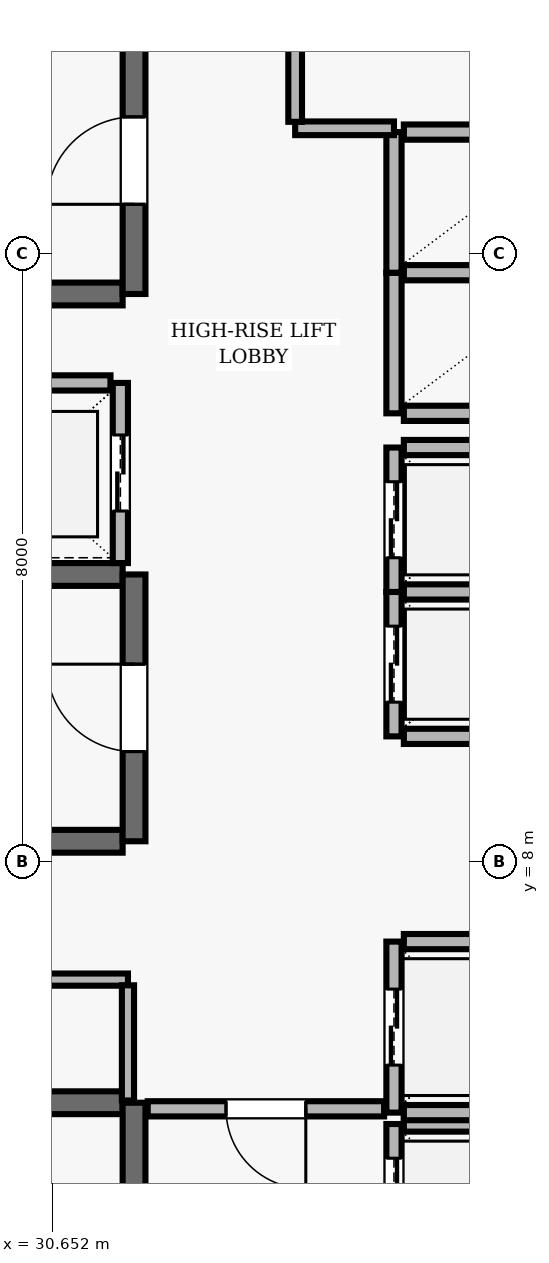
"""IFC4 building model, lengths in metres.
Left out: names, types, materials, properties, quantities, classifications, styles, units other than length and angle.
Written with IfcOpenShell. Run it as: python <this file> out.ifc"""

import sys

from ifc_helpers import new_model, si_unit, direction, frame, frame_2d, origin, place, context, subcontext, project, spatial, rectangle, extrude, element, fill, save


model = new_model("IFC4")
c1 = context("Model", 3, precision=1e-05, world=origin(), true_north=direction((0.0, 1.0)))
c2 = subcontext(c1, "Body", "Model", "MODEL_VIEW")
j1 = project(units=[si_unit("LENGTHUNIT", "METRE"), si_unit("PLANEANGLEUNIT", "RADIAN")], contexts=[c1])
p1 = place(None, origin())
s1 = spatial("IfcSite", under=j1, at=p1, CompositionType="ELEMENT")
p2 = place(p1, origin())
s2 = spatial("IfcBuilding", under=s1, at=p2, CompositionType="ELEMENT")
p3 = place(p2, frame((0.0, 0.0, 256.0)))
s3 = spatial("IfcBuildingStorey", under=s2, at=p3, CompositionType="ELEMENT", Elevation=256.0)
p4 = place(p3, frame((31.58, 4.83, 0.0), z_axis=(0.0, 0.0, 1.0), x_axis=(-1.0, 0.0, 0.0)))
e1 = element("IfcWall", 1, at=p4, inside=s3, PredefinedType="SHEAR", context=c2, shape_type="SweptSolid", body=[
    extrude(rectangle(XDim=8.36, YDim=0.3, at=frame_2d((4.18, 0.0))), origin(), (0.0, 0.0, 1.0), 3.69),
])
p5 = place(p3, frame((31.73, 0.96, 0.0), z_axis=(0.0, 0.0, 1.0), x_axis=(0.0, 1.0, 0.0)))
e2 = element("IfcWall", 2, at=p5, inside=s3, PredefinedType="SHEAR", context=c2, shape_type="SweptSolid", body=[
    extrude(rectangle(XDim=3.87, YDim=0.3, at=frame_2d((1.935, 0.0))), origin(), (0.0, 0.0, 1.0), 3.69),
])
p6 = place(p5, frame((1.54, 0.0, 0.0)))
e3 = element("IfcOpeningElement", 3, at=p6, cuts=e2, PredefinedType="OPENING", context=c2, shape_type="SweptSolid", body=[
    extrude(rectangle(XDim=1.15, YDim=2.15, at=frame_2d((0.575, 1.075))), frame((0.0, 0.16, 0.0), z_axis=(0.0, -1.0, 0.0), x_axis=(1.0, 0.0, 0.0)), (0.0, 0.0, 1.0), 0.32),
])
p7 = place(p3, frame((23.22, 15.47, 0.0), z_axis=(0.0, 0.0, 1.0), x_axis=(1.0, 0.0, 0.0)))
e4 = element("IfcWall", 4, at=p7, inside=s3, PredefinedType="SHEAR", context=c2, shape_type="SweptSolid", body=[
    extrude(rectangle(XDim=8.36, YDim=0.3, at=frame_2d((4.18, 0.0))), origin(), (0.0, 0.0, 1.0), 3.69),
])
p8 = place(p3, frame((31.73, 15.47, 0.0), z_axis=(0.0, 0.0, 1.0), x_axis=(0.0, 1.0, 0.0)))
e5 = element("IfcWall", 5, at=p8, inside=s3, PredefinedType="SHEAR", context=c2, shape_type="SweptSolid", body=[
    extrude(rectangle(XDim=3.51, YDim=0.3, at=frame_2d((1.755, 0.0))), origin(), (0.0, 0.0, 1.0), 3.69),
])
p9 = place(p8, frame((1.18, 0.0, 0.0)))
e6 = element("IfcOpeningElement", 6, at=p9, cuts=e5, PredefinedType="OPENING", context=c2, shape_type="SweptSolid", body=[
    extrude(rectangle(XDim=1.15, YDim=2.15, at=frame_2d((0.575, 1.075))), frame((0.0, 0.16, 0.0), z_axis=(0.0, -1.0, 0.0), x_axis=(1.0, 0.0, 0.0)), (0.0, 0.0, 1.0), 0.32),
])
for number, where, z_axis, x_axis in (
    (7, (31.58, 11.78, 0.0), (0.0, 0.0, 1.0), (-1.0, 0.0, 0.0)),
    (8, (23.22, 8.27, 0.0), (0.0, 0.0, 1.0), (1.0, 0.0, 0.0)),
):
    element("IfcWall", number, at=place(p3, frame(where, z_axis=z_axis, x_axis=x_axis)), inside=s3, PredefinedType="SHEAR", context=c2, shape_type="SweptSolid", body=[
        extrude(rectangle(XDim=8.36, YDim=0.3, at=frame_2d((4.18, 0.0))), origin(), (0.0, 0.0, 1.0), 3.69),
    ])
p10 = place(p3, frame((31.73, 8.27, 0.0), z_axis=(0.0, 0.0, 1.0), x_axis=(0.0, 1.0, 0.0)))
e9 = element("IfcWall", 9, at=p10, inside=s3, PredefinedType="SHEAR", context=c2, shape_type="SweptSolid", body=[
    extrude(rectangle(XDim=3.51, YDim=0.3, at=frame_2d((1.755, 0.0))), origin(), (0.0, 0.0, 1.0), 3.69),
])
p11 = place(p10, frame((1.18, 0.0, 0.0)))
e10 = element("IfcOpeningElement", 10, at=p11, cuts=e9, PredefinedType="OPENING", context=c2, shape_type="SweptSolid", body=[
    extrude(rectangle(XDim=1.15, YDim=2.15, at=frame_2d((0.575, 1.075))), frame((0.0, 0.16, 0.0), z_axis=(0.0, -1.0, 0.0), x_axis=(1.0, 0.0, 0.0)), (0.0, 0.0, 1.0), 0.32),
])
p12 = place(p3, frame((35.15, 4.55, 0.0), z_axis=(0.0, 0.0, 1.0), x_axis=(0.0, -1.0, 0.0)))
e11 = element("IfcWall", 11, at=p12, inside=s3, PredefinedType="SOLIDWALL", context=c2, shape_type="SweptSolid", body=[
    extrude(rectangle(XDim=2.1, YDim=0.2, at=frame_2d((1.05, 0.0))), origin(), (0.0, 0.0, 1.0), 3.69),
])
p13 = place(p12, frame((0.45, 0.0, 0.0)))
e12 = element("IfcOpeningElement", 12, at=p13, cuts=e11, PredefinedType="OPENING", context=c2, shape_type="SweptSolid", body=[
    extrude(rectangle(XDim=1.2, YDim=2.15, at=frame_2d((0.6, 1.075))), frame((0.0, 0.11, 0.0), z_axis=(0.0, -1.0, 0.0), x_axis=(1.0, 0.0, 0.0)), (0.0, 0.0, 1.0), 0.22),
])
p14 = place(p3, frame((37.42, 4.55, 0.0), z_axis=(0.0, 0.0, 1.0), x_axis=(-1.0, 0.0, 0.0)))
e13 = element("IfcWall", 13, at=p14, inside=s3, PredefinedType="SOLIDWALL", context=c2, shape_type="SweptSolid", body=[
    extrude(rectangle(XDim=2.14, YDim=0.2, at=frame_2d((1.07, 0.0))), origin(), (0.0, 0.0, 1.0), 3.69),
])
p15 = place(p3, frame((35.15, 6.95, 0.0), z_axis=(0.0, 0.0, 1.0), x_axis=(0.0, -1.0, 0.0)))
e14 = element("IfcWall", 14, at=p15, inside=s3, PredefinedType="SOLIDWALL", context=c2, shape_type="SweptSolid", body=[
    extrude(rectangle(XDim=2.25, YDim=0.2, at=frame_2d((1.125, 0.0))), origin(), (0.0, 0.0, 1.0), 3.69),
])
p16 = place(p15, frame((0.625, 0.0, 0.0)))
e15 = element("IfcOpeningElement", 15, at=p16, cuts=e14, PredefinedType="OPENING", context=c2, shape_type="SweptSolid", body=[
    extrude(rectangle(XDim=1.0, YDim=2.1, at=frame_2d((0.5, 1.05))), frame((0.0, 0.11, 0.0), z_axis=(0.0, -1.0, 0.0), x_axis=(1.0, 0.0, 0.0)), (0.0, 0.0, 1.0), 0.22),
])
for number, where, z_axis, x_axis in (
    (16, (35.28, 4.7, 0.0), (0.0, 0.0, 1.0), (1.0, 0.0, 0.0)),
    (17, (37.42, 6.95, 0.0), (0.0, 0.0, 1.0), (-1.0, 0.0, 0.0)),
):
    element("IfcWall", number, at=place(p3, frame(where, z_axis=z_axis, x_axis=x_axis)), inside=s3, PredefinedType="SOLIDWALL", context=c2, shape_type="SweptSolid", body=[
        extrude(rectangle(XDim=2.14, YDim=0.2, at=frame_2d((1.07, 0.0))), origin(), (0.0, 0.0, 1.0), 3.69),
    ])
p17 = place(p3, frame((35.15, 11.55, 0.0), z_axis=(0.0, 0.0, 1.0), x_axis=(0.0, -1.0, 0.0)))
e18 = element("IfcWall", 18, at=p17, inside=s3, PredefinedType="SOLIDWALL", context=c2, shape_type="SweptSolid", body=[
    extrude(rectangle(XDim=1.9, YDim=0.2, at=frame_2d((0.95, 0.0))), origin(), (0.0, 0.0, 1.0), 3.69),
])
p18 = place(p17, frame((0.45, 0.0, 0.0)))
e19 = element("IfcOpeningElement", 19, at=p18, cuts=e18, PredefinedType="OPENING", context=c2, shape_type="SweptSolid", body=[
    extrude(rectangle(XDim=1.0, YDim=2.1, at=frame_2d((0.5, 1.05))), frame((0.0, 0.11, 0.0), z_axis=(0.0, -1.0, 0.0), x_axis=(1.0, 0.0, 0.0)), (0.0, 0.0, 1.0), 0.22),
])
for number, where, z_axis, x_axis in (
    (20, (35.28, 9.65, 0.0), (0.0, 0.0, 1.0), (1.0, 0.0, 0.0)),
    (21, (37.42, 11.55, 0.0), (0.0, 0.0, 1.0), (-1.0, 0.0, 0.0)),
):
    element("IfcWall", number, at=place(p3, frame(where, z_axis=z_axis, x_axis=x_axis)), inside=s3, PredefinedType="SOLIDWALL", context=c2, shape_type="SweptSolid", body=[
        extrude(rectangle(XDim=2.14, YDim=0.2, at=frame_2d((1.07, 0.0))), origin(), (0.0, 0.0, 1.0), 3.69),
    ])
p19 = place(p3, frame((35.15, 13.45, 0.0), z_axis=(0.0, 0.0, 1.0), x_axis=(0.0, -1.0, 0.0)))
e22 = element("IfcWall", 22, at=p19, inside=s3, PredefinedType="SOLIDWALL", context=c2, shape_type="SweptSolid", body=[
    extrude(rectangle(XDim=1.9, YDim=0.2, at=frame_2d((0.95, 0.0))), origin(), (0.0, 0.0, 1.0), 3.69),
])
p20 = place(p19, frame((0.45, 0.0, 0.0)))
e23 = element("IfcOpeningElement", 23, at=p20, cuts=e22, PredefinedType="OPENING", context=c2, shape_type="SweptSolid", body=[
    extrude(rectangle(XDim=1.0, YDim=2.1, at=frame_2d((0.5, 1.05))), frame((0.0, 0.11, 0.0), z_axis=(0.0, -1.0, 0.0), x_axis=(1.0, 0.0, 0.0)), (0.0, 0.0, 1.0), 0.22),
])
p21 = place(p3, frame((37.42, 13.45, 0.0), z_axis=(0.0, 0.0, 1.0), x_axis=(-1.0, 0.0, 0.0)))
e24 = element("IfcWall", 24, at=p21, inside=s3, PredefinedType="SOLIDWALL", context=c2, shape_type="SweptSolid", body=[
    extrude(rectangle(XDim=2.14, YDim=0.2, at=frame_2d((1.07, 0.0))), origin(), (0.0, 0.0, 1.0), 3.69),
])
p22 = place(p3, frame((31.55, 11.93, 0.0), z_axis=(0.0, 0.0, 1.0), x_axis=(0.0, 1.0, 0.0)))
e25 = element("IfcWall", 25, at=p22, inside=s3, PredefinedType="SOLIDWALL", context=c2, shape_type="SweptSolid", body=[
    extrude(rectangle(XDim=2.37, YDim=0.2, at=frame_2d((1.185, 0.0))), origin(), (0.0, 0.0, 1.0), 3.69),
])
p23 = place(p22, frame((0.685, 0.0, 0.0)))
e26 = element("IfcOpeningElement", 26, at=p23, cuts=e25, PredefinedType="OPENING", context=c2, shape_type="SweptSolid", body=[
    extrude(rectangle(XDim=1.0, YDim=2.1, at=frame_2d((0.5, 1.05))), frame((0.0, 0.11, 0.0), z_axis=(0.0, -1.0, 0.0), x_axis=(1.0, 0.0, 0.0)), (0.0, 0.0, 1.0), 0.22),
])
p24 = place(p3, frame((31.42, 14.3, 0.0), z_axis=(0.0, 0.0, 1.0), x_axis=(-1.0, 0.0, 0.0)))
e27 = element("IfcWall", 27, at=p24, inside=s3, PredefinedType="SOLIDWALL", context=c2, shape_type="SweptSolid", body=[
    extrude(rectangle(XDim=2.44, YDim=0.2, at=frame_2d((1.22, 0.0))), origin(), (0.0, 0.0, 1.0), 3.69),
])
p25 = place(p3, frame((35.15, 15.75, 0.0), z_axis=(0.0, 0.0, 1.0), x_axis=(0.0, -1.0, 0.0)))
e28 = element("IfcWall", 28, at=p25, inside=s3, PredefinedType="SOLIDWALL", context=c2, shape_type="SweptSolid", body=[
    extrude(rectangle(XDim=1.85, YDim=0.2, at=frame_2d((0.925, 0.0))), origin(), (0.0, 0.0, 1.0), 3.69),
])
for number, where, z_axis, x_axis in (
    (29, (35.28, 13.9, 0.0), (0.0, 0.0, 1.0), (1.0, 0.0, 0.0)),
    (30, (37.42, 15.75, 0.0), (0.0, 0.0, 1.0), (-1.0, 0.0, 0.0)),
):
    element("IfcWall", number, at=place(p3, frame(where, z_axis=z_axis, x_axis=x_axis)), inside=s3, PredefinedType="SOLIDWALL", context=c2, shape_type="SweptSolid", body=[
        extrude(rectangle(XDim=2.14, YDim=0.2, at=frame_2d((1.07, 0.0))), origin(), (0.0, 0.0, 1.0), 3.69),
    ])
p26 = place(p3, frame((35.15, 17.6, 0.0), z_axis=(0.0, 0.0, 1.0), x_axis=(0.0, -1.0, 0.0)))
e31 = element("IfcWall", 31, at=p26, inside=s3, PredefinedType="SOLIDWALL", context=c2, shape_type="SweptSolid", body=[
    extrude(rectangle(XDim=1.85, YDim=0.2, at=frame_2d((0.925, 0.0))), origin(), (0.0, 0.0, 1.0), 3.69),
])
p27 = place(p3, frame((37.42, 17.6, 0.0), z_axis=(0.0, 0.0, 1.0), x_axis=(-1.0, 0.0, 0.0)))
e32 = element("IfcWall", 32, at=p27, inside=s3, PredefinedType="SOLIDWALL", context=c2, shape_type="SweptSolid", body=[
    extrude(rectangle(XDim=2.14, YDim=0.2, at=frame_2d((1.07, 0.0))), origin(), (0.0, 0.0, 1.0), 3.69),
])
p28 = place(p3, frame((28.55, 6.45, 0.0), z_axis=(0.0, 0.0, 1.0), x_axis=(1.0, 0.0, 0.0)))
e33 = element("IfcWall", 33, at=p28, inside=s3, PredefinedType="PARTITIONING", context=c2, shape_type="SweptSolid", body=[
    extrude(rectangle(XDim=3.1, YDim=0.16, at=frame_2d((1.55, 0.0))), origin(), (0.0, 0.0, 1.0), 3.69),
])
p29 = place(p28, frame((1.11, 0.0, 0.0)))
e34 = element("IfcOpeningElement", 34, at=p29, cuts=e33, PredefinedType="OPENING", context=c2, shape_type="SweptSolid", body=[
    extrude(rectangle(XDim=0.88, YDim=2.1, at=frame_2d((0.44, 1.05))), frame((0.0, 0.09, 0.0), z_axis=(0.0, -1.0, 0.0), x_axis=(1.0, 0.0, 0.0)), (0.0, 0.0, 1.0), 0.18),
])
p30 = place(p3, frame((33.85, 17.65, 0.0), z_axis=(0.0, 0.0, 1.0), x_axis=(1.0, 0.0, 0.0)))
e35 = element("IfcWall", 35, at=p30, inside=s3, PredefinedType="PARTITIONING", context=c2, shape_type="SweptSolid", body=[
    extrude(rectangle(XDim=1.3, YDim=0.18, at=frame_2d((0.65, 0.0))), origin(), (0.0, 0.0, 1.0), 3.69),
])
p31 = place(p3, frame((35.02, 4.75, 0.0), z_axis=(0.0, 0.0, 1.0), x_axis=(-1.0, 0.0, 0.0)))
e36 = element("IfcWall", 36, at=p31, inside=s3, PredefinedType="SOLIDWALL", context=c2, shape_type="SweptSolid", body=[
    extrude(rectangle(XDim=3.11, YDim=0.2, at=frame_2d((1.555, 0.0))), origin(), (0.0, 0.0, 1.0), 3.69),
])
p32 = place(p31, frame((1.03, 0.0, 0.0)))
e37 = element("IfcOpeningElement", 37, at=p32, cuts=e36, PredefinedType="OPENING", context=c2, shape_type="SweptSolid", body=[
    extrude(rectangle(XDim=1.05, YDim=2.15, at=frame_2d((0.525, 1.075))), frame((0.0, 0.11, 0.0), z_axis=(0.0, -1.0, 0.0), x_axis=(1.0, 0.0, 0.0)), (0.0, 0.0, 1.0), 0.22),
])
p33 = place(p3, frame((31.65, 4.86, 0.0), z_axis=(0.0, 0.0, 1.0), x_axis=(0.0, 1.0, 0.0)))
e38 = element("IfcWall", 38, at=p33, inside=s3, PredefinedType="PARTITIONING", context=c2, shape_type="SweptSolid", body=[
    extrude(rectangle(XDim=1.515, YDim=0.16, at=frame_2d((0.757, 0.0))), origin(), (0.0, 0.0, 1.0), 3.69),
])
p34 = place(p3, frame((33.85, 17.735, 0.0), z_axis=(0.0, 0.0, 1.0), x_axis=(0.0, 1.0, 0.0)))
e39 = element("IfcWall", 39, at=p34, inside=s3, PredefinedType="PARTITIONING", context=c2, shape_type="SweptSolid", body=[
    extrude(rectangle(XDim=6.03, YDim=0.18, at=frame_2d((3.015, 0.0))), origin(), (0.0, 0.0, 1.0), 3.69),
])
p35 = place(p34, frame((2.54, 0.0, 0.0)))
e40 = element("IfcOpeningElement", 40, at=p35, cuts=e39, PredefinedType="OPENING", context=c2, shape_type="SweptSolid", body=[
    extrude(rectangle(XDim=0.95, YDim=2.1, at=frame_2d((0.475, 1.05))), frame((0.0, 0.1, 0.0), z_axis=(0.0, -1.0, 0.0), x_axis=(1.0, 0.0, 0.0)), (0.0, 0.0, 1.0), 0.2),
])
p36 = place(p9, origin())
e41 = element("IfcDoor", 41, at=p36, inside=s3, OperationType="SINGLE_SWING_LEFT", PredefinedType="DOOR", context=c2, shape_type="SweptSolid", body=[
    extrude(rectangle(XDim=1.15, YDim=2.15, at=frame_2d((0.575, 1.075))), frame((0.0, 0.025, 0.0), z_axis=(0.0, -1.0, 0.0), x_axis=(1.0, 0.0, 0.0)), (0.0, 0.0, 1.0), 0.05),
])
fill(e6, e41)
p37 = place(p11, origin())
e42 = element("IfcDoor", 42, at=p37, inside=s3, OperationType="SINGLE_SWING_RIGHT", PredefinedType="DOOR", context=c2, shape_type="SweptSolid", body=[
    extrude(rectangle(XDim=1.15, YDim=2.15, at=frame_2d((0.575, 1.075))), frame((0.0, 0.025, 0.0), z_axis=(0.0, -1.0, 0.0), x_axis=(1.0, 0.0, 0.0)), (0.0, 0.0, 1.0), 0.05),
])
fill(e10, e42)
p38 = place(p13, origin())
e43 = element("IfcDoor", 43, at=p38, inside=s3, OperationType="DOUBLE_DOOR_SLIDING", PredefinedType="DOOR", context=c2, shape_type="SweptSolid", body=[
    extrude(rectangle(XDim=1.2, YDim=2.15, at=frame_2d((0.6, 1.075))), frame((0.0, 0.025, 0.0), z_axis=(0.0, -1.0, 0.0), x_axis=(1.0, 0.0, 0.0)), (0.0, 0.0, 1.0), 0.05),
])
fill(e12, e43)
p39 = place(p16, origin())
e44 = element("IfcDoor", 44, at=p39, inside=s3, OperationType="DOUBLE_DOOR_SLIDING", PredefinedType="DOOR", context=c2, shape_type="SweptSolid", body=[
    extrude(rectangle(XDim=1.0, YDim=2.1, at=frame_2d((0.5, 1.05))), frame((0.0, 0.025, 0.0), z_axis=(0.0, -1.0, 0.0), x_axis=(1.0, 0.0, 0.0)), (0.0, 0.0, 1.0), 0.05),
])
fill(e15, e44)
p40 = place(p18, origin())
e45 = element("IfcDoor", 45, at=p40, inside=s3, OperationType="DOUBLE_DOOR_SLIDING", PredefinedType="DOOR", context=c2, shape_type="SweptSolid", body=[
    extrude(rectangle(XDim=1.0, YDim=2.1, at=frame_2d((0.5, 1.05))), frame((0.0, 0.025, 0.0), z_axis=(0.0, -1.0, 0.0), x_axis=(1.0, 0.0, 0.0)), (0.0, 0.0, 1.0), 0.05),
])
fill(e19, e45)
p41 = place(p20, origin())
e46 = element("IfcDoor", 46, at=p41, inside=s3, OperationType="DOUBLE_DOOR_SLIDING", PredefinedType="DOOR", context=c2, shape_type="SweptSolid", body=[
    extrude(rectangle(XDim=1.0, YDim=2.1, at=frame_2d((0.5, 1.05))), frame((0.0, 0.025, 0.0), z_axis=(0.0, -1.0, 0.0), x_axis=(1.0, 0.0, 0.0)), (0.0, 0.0, 1.0), 0.05),
])
fill(e23, e46)
p42 = place(p23, origin())
e47 = element("IfcDoor", 47, at=p42, inside=s3, OperationType="DOUBLE_DOOR_SLIDING", PredefinedType="DOOR", context=c2, shape_type="SweptSolid", body=[
    extrude(rectangle(XDim=1.0, YDim=2.1, at=frame_2d((0.5, 1.05))), frame((0.0, 0.025, 0.0), z_axis=(0.0, -1.0, 0.0), x_axis=(1.0, 0.0, 0.0)), (0.0, 0.0, 1.0), 0.05),
])
fill(e26, e47)
p43 = place(p32, origin())
e48 = element("IfcDoor", 48, at=p43, inside=s3, OperationType="SINGLE_SWING_LEFT", PredefinedType="DOOR", context=c2, shape_type="SweptSolid", body=[
    extrude(rectangle(XDim=1.05, YDim=2.15, at=frame_2d((0.525, 1.075))), frame((0.0, 0.025, 0.0), z_axis=(0.0, -1.0, 0.0), x_axis=(1.0, 0.0, 0.0)), (0.0, 0.0, 1.0), 0.05),
])
fill(e37, e48)
save(model, sys.argv[1])
